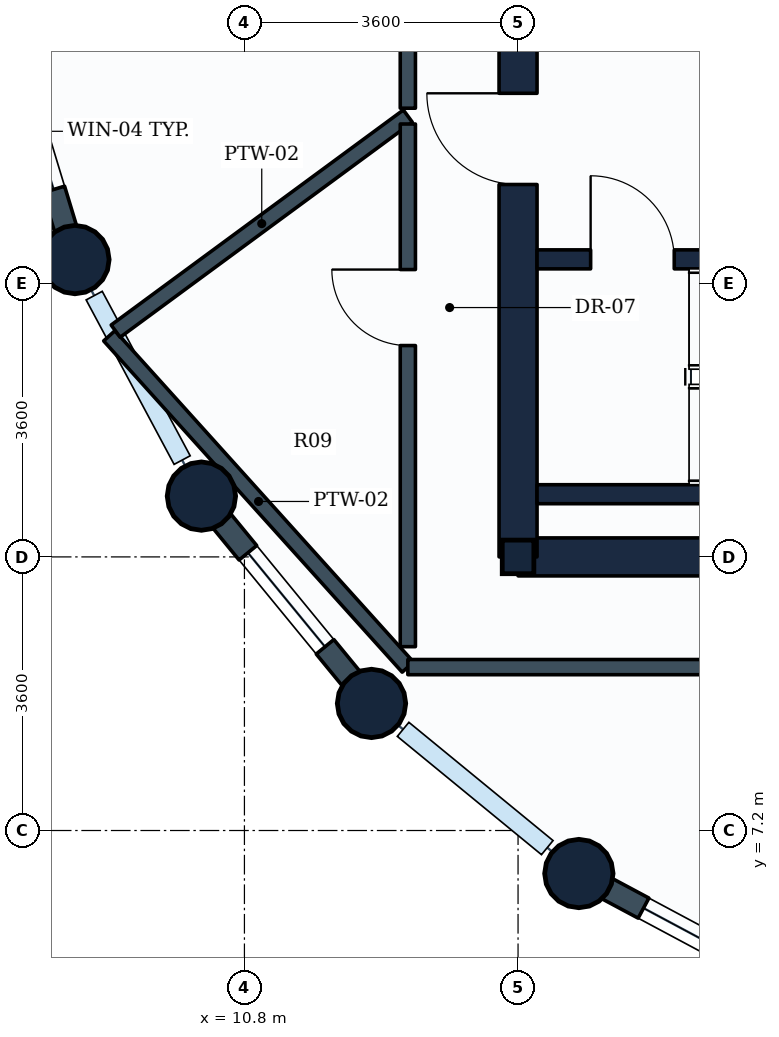
"""IFC4 building model, lengths in metres.
Left out: names, types, materials, properties, quantities, classifications, styles, units other than length and angle.
Written with IfcOpenShell. Run it as: python <this file> out.ifc"""

import sys

from ifc_helpers import new_model, si_unit, direction, frame, frame_2d, origin, origin_2d, place, context, subcontext, project, spatial, rectangle, circle, i_section, extrude, element, fill, save


model = new_model("IFC4")
c1 = context("Model", 3, precision=1e-05, world=origin(), true_north=direction((0.0, 1.0)))
c2 = subcontext(c1, "Body", "Model", "MODEL_VIEW")
j1 = project(units=[si_unit("LENGTHUNIT", "METRE"), si_unit("PLANEANGLEUNIT", "RADIAN")], contexts=[c1])
p1 = place(None, origin())
s1 = spatial("IfcSite", under=j1, at=p1, CompositionType="ELEMENT")
p2 = place(p1, origin())
s2 = spatial("IfcBuilding", under=s1, at=p2, CompositionType="ELEMENT")
p3 = place(p2, frame((0.0, 0.0, 135.2)))
s3 = spatial("IfcBuildingStorey", under=s2, at=p3, CompositionType="ELEMENT", Elevation=135.2)
for number, where, z_axis, x_axis in (
    (1, (8.57, 14.712, 0.0), (0.0, 0.0, 1.0), (1.0, 0.0, 0.0)),
    (2, (10.234, 11.6, 0.0), (0.0, 0.0, 1.0), (1.0, 0.0, 0.0)),
    (3, (12.472, 8.872, 0.0), (0.0, 0.0, 1.0), (1.0, 0.0, 0.0)),
):
    element("IfcColumn", number, at=place(p3, frame(where, z_axis=z_axis, x_axis=x_axis)), inside=s3, PredefinedType="COLUMN", context=c2, shape_type="SweptSolid", body=[
        extrude(circle(Radius=0.45, at=origin_2d()), origin(), (0.0, 0.0, 1.0), 3.8),
    ])
p4 = place(p3, frame((14.4, 10.8, 0.0), z_axis=(0.0, 0.0, 1.0), x_axis=(1.0, 0.0, 0.0)))
e4 = element("IfcColumn", 4, at=p4, inside=s3, PredefinedType="COLUMN", context=c2, shape_type="SweptSolid", body=[
    extrude(i_section(OverallWidth=0.416, OverallDepth=0.442, WebThickness=0.025, FlangeThickness=0.041, FilletRadius=0.015, at=origin_2d()), origin(), (0.0, 0.0, 1.0), 3.8),
])
p5 = place(p3, frame((15.2, 6.634, 0.0), z_axis=(0.0, 0.0, 1.0), x_axis=(1.0, 0.0, 0.0)))
e5 = element("IfcColumn", 5, at=p5, inside=s3, PredefinedType="COLUMN", context=c2, shape_type="SweptSolid", body=[
    extrude(circle(Radius=0.45, at=origin_2d()), origin(), (0.0, 0.0, 1.0), 3.8),
])
p6 = place(p3, frame((8.57, 14.712, 0.0), z_axis=(0.0, 0.0, 1.0), x_axis=(-0.290305086481, 0.956934144423, 0.0)))
e6 = element("IfcWall", 6, at=p6, inside=s3, PredefinedType="STANDARD", context=c2, shape_type="SweptSolid", body=[
    extrude(rectangle(XDim=3.528, YDim=0.3, at=frame_2d((1.764, 0.0))), origin(), (0.0, 0.0, 1.0), 2.93),
])
p7 = place(p6, frame((0.964, 0.0, 0.85)))
e7 = element("IfcOpeningElement", 7, at=p7, cuts=e6, PredefinedType="OPENING", context=c2, shape_type="SweptSolid", body=[
    extrude(rectangle(XDim=1.6, YDim=1.35, at=frame_2d((0.8, 0.675))), frame((0.0, 0.16, 0.0), z_axis=(0.0, -1.0, 0.0), x_axis=(1.0, 0.0, 0.0)), (0.0, 0.0, 1.0), 0.32),
])
p8 = place(p3, frame((12.472, 8.872, 0.0), z_axis=(0.0, 0.0, 1.0), x_axis=(-0.634258295121, 0.773121216285, 0.0)))
e8 = element("IfcWall", 8, at=p8, inside=s3, PredefinedType="STANDARD", context=c2, shape_type="SweptSolid", body=[
    extrude(rectangle(XDim=3.529, YDim=0.3, at=frame_2d((1.764, 0.0))), origin(), (0.0, 0.0, 1.0), 2.93),
])
p9 = place(p8, frame((0.964, 0.0, 0.85)))
e9 = element("IfcOpeningElement", 9, at=p9, cuts=e8, PredefinedType="OPENING", context=c2, shape_type="SweptSolid", body=[
    extrude(rectangle(XDim=1.6, YDim=1.35, at=frame_2d((0.8, 0.675))), frame((0.0, 0.16, 0.0), z_axis=(0.0, -1.0, 0.0), x_axis=(1.0, 0.0, 0.0)), (0.0, 0.0, 1.0), 0.32),
])
p10 = place(p3, frame((18.312, 4.97, 0.0), z_axis=(0.0, 0.0, 1.0), x_axis=(-0.881846862014, 0.471535907389, 0.0)))
e10 = element("IfcWall", 10, at=p10, inside=s3, PredefinedType="STANDARD", context=c2, shape_type="SweptSolid", body=[
    extrude(rectangle(XDim=3.529, YDim=0.3, at=frame_2d((1.765, 0.0))), origin(), (0.0, 0.0, 1.0), 2.93),
])
p11 = place(p10, frame((0.964, 0.0, 0.85)))
e11 = element("IfcOpeningElement", 11, at=p11, cuts=e10, PredefinedType="OPENING", context=c2, shape_type="SweptSolid", body=[
    extrude(rectangle(XDim=1.6, YDim=1.35, at=frame_2d((0.8, 0.675))), frame((0.0, 0.16, 0.0), z_axis=(0.0, -1.0, 0.0), x_axis=(1.0, 0.0, 0.0)), (0.0, 0.0, 1.0), 0.32),
])
p12 = place(p3, frame((14.4, 10.8, 0.0), z_axis=(0.0, 0.0, 1.0), x_axis=(1.0, 0.0, 0.0)))
e12 = element("IfcWall", 12, at=p12, inside=s3, PredefinedType="SHEAR", context=c2, shape_type="SweptSolid", body=[
    extrude(rectangle(XDim=18.0, YDim=0.5, at=frame_2d((9.0, 0.0))), origin(), (0.0, 0.0, 1.0), 3.55),
])
p13 = place(p3, frame((14.4, 10.8, 0.0), z_axis=(0.0, 0.0, 1.0), x_axis=(0.0, 1.0, 0.0)))
e13 = element("IfcWall", 13, at=p13, inside=s3, PredefinedType="SHEAR", context=c2, shape_type="SweptSolid", body=[
    extrude(rectangle(XDim=14.4, YDim=0.5, at=frame_2d((7.2, 0.0))), origin(), (0.0, 0.0, 1.0), 3.55),
])
p14 = place(p13, frame((11.05, 0.0, 0.0)))
e14 = element("IfcOpeningElement", 14, at=p14, cuts=e13, PredefinedType="OPENING", context=c2, shape_type="SweptSolid", body=[
    extrude(rectangle(XDim=1.1, YDim=2.1, at=frame_2d((0.55, 1.05))), frame((0.0, 0.26, 0.0), z_axis=(0.0, -1.0, 0.0), x_axis=(1.0, 0.0, 0.0)), (0.0, 0.0, 1.0), 0.52),
])
p15 = place(p13, frame((4.9, 0.0, 0.0)))
e15 = element("IfcOpeningElement", 15, at=p15, cuts=e13, PredefinedType="OPENING", context=c2, shape_type="SweptSolid", body=[
    extrude(rectangle(XDim=1.2, YDim=2.1, at=frame_2d((0.6, 1.05))), frame((0.0, 0.26, 0.0), z_axis=(0.0, -1.0, 0.0), x_axis=(1.0, 0.0, 0.0)), (0.0, 0.0, 1.0), 0.52),
])
p16 = place(p13, frame((8.15, 0.0, 0.0)))
e16 = element("IfcOpeningElement", 16, at=p16, cuts=e13, PredefinedType="OPENING", context=c2, shape_type="SweptSolid", body=[
    extrude(rectangle(XDim=0.9, YDim=2.1, at=frame_2d((0.45, 1.05))), frame((0.0, 0.26, 0.0), z_axis=(0.0, -1.0, 0.0), x_axis=(1.0, 0.0, 0.0)), (0.0, 0.0, 1.0), 0.52),
])
p17 = place(p3, frame((14.65, 11.625, 0.0), z_axis=(0.0, 0.0, 1.0), x_axis=(1.0, 0.0, 0.0)))
e17 = element("IfcWall", 17, at=p17, inside=s3, PredefinedType="SHEAR", context=c2, shape_type="SweptSolid", body=[
    extrude(rectangle(XDim=8.7, YDim=0.25, at=frame_2d((4.35, 0.0))), origin(), (0.0, 0.0, 1.0), 3.55),
])
p18 = place(p3, frame((14.65, 14.715, 0.0), z_axis=(0.0, 0.0, 1.0), x_axis=(1.0, 0.0, 0.0)))
e18 = element("IfcWall", 18, at=p18, inside=s3, PredefinedType="SHEAR", context=c2, shape_type="SweptSolid", body=[
    extrude(rectangle(XDim=8.7, YDim=0.25, at=frame_2d((4.35, 0.0))), origin(), (0.0, 0.0, 1.0), 3.55),
])
p19 = place(p18, frame((0.705, 0.0, 0.0)))
e19 = element("IfcOpeningElement", 19, at=p19, cuts=e18, PredefinedType="OPENING", context=c2, shape_type="SweptSolid", body=[
    extrude(rectangle(XDim=1.1, YDim=2.1, at=frame_2d((0.55, 1.05))), frame((0.0, 0.135, 0.0), z_axis=(0.0, -1.0, 0.0), x_axis=(1.0, 0.0, 0.0)), (0.0, 0.0, 1.0), 0.27),
])
p20 = place(p3, frame((12.95, 9.35, 0.0), z_axis=(0.0, 0.0, 1.0), x_axis=(-0.669433552235, 0.742871939934, 0.0)))
e20 = element("IfcWall", 20, at=p20, inside=s3, PredefinedType="PARTITIONING", context=c2, shape_type="SweptSolid", body=[
    extrude(rectangle(XDim=5.868, YDim=0.2, at=frame_2d((2.934, 0.0))), origin(), (0.0, 0.0, 1.0), 2.93),
])
p21 = place(p3, frame((12.95, 16.6, 0.0), z_axis=(0.0, 0.0, 1.0), x_axis=(-0.805356553796, -0.592790706116, 0.0)))
e21 = element("IfcWall", 21, at=p21, inside=s3, PredefinedType="PARTITIONING", context=c2, shape_type="SweptSolid", body=[
    extrude(rectangle(XDim=4.773, YDim=0.2, at=frame_2d((2.387, 0.0))), origin(), (0.0, 0.0, 1.0), 2.93),
])
p22 = place(p3, frame((12.95, 16.704, 0.0), z_axis=(0.0, 0.0, 1.0), x_axis=(0.0, 1.0, 0.0)))
e22 = element("IfcWall", 22, at=p22, inside=s3, PredefinedType="PARTITIONING", context=c2, shape_type="SweptSolid", body=[
    extrude(rectangle(XDim=8.417, YDim=0.2, at=frame_2d((4.208, 0.0))), origin(), (0.0, 0.0, 1.0), 3.18),
])
p23 = place(p22, frame((3.696, 0.0, 0.0)))
e23 = element("IfcOpeningElement", 23, at=p23, cuts=e22, PredefinedType="OPENING", context=c2, shape_type="SweptSolid", body=[
    extrude(rectangle(XDim=1.0, YDim=2.1, at=frame_2d((0.5, 1.05))), frame((0.0, 0.11, 0.0), z_axis=(0.0, -1.0, 0.0), x_axis=(1.0, 0.0, 0.0)), (0.0, 0.0, 1.0), 0.22),
])
p24 = place(p3, frame((12.95, 9.619, 0.0), z_axis=(0.0, 0.0, 1.0), x_axis=(0.0, 1.0, 0.0)))
e24 = element("IfcWall", 24, at=p24, inside=s3, PredefinedType="PARTITIONING", context=c2, shape_type="SweptSolid", body=[
    extrude(rectangle(XDim=6.877, YDim=0.2, at=frame_2d((3.438, 0.0))), origin(), (0.0, 0.0, 1.0), 3.17),
])
p25 = place(p24, frame((3.962, 0.0, 0.0)))
e25 = element("IfcOpeningElement", 25, at=p25, cuts=e24, PredefinedType="OPENING", context=c2, shape_type="SweptSolid", body=[
    extrude(rectangle(XDim=1.0, YDim=2.1, at=frame_2d((0.5, 1.05))), frame((0.0, 0.11, 0.0), z_axis=(0.0, -1.0, 0.0), x_axis=(1.0, 0.0, 0.0)), (0.0, 0.0, 1.0), 0.22),
])
p26 = place(p3, frame((12.95, 9.35, 0.0), z_axis=(0.0, 0.0, 1.0), x_axis=(1.0, 0.0, 0.0)))
e26 = element("IfcWall", 26, at=p26, inside=s3, PredefinedType="PARTITIONING", context=c2, shape_type="SweptSolid", body=[
    extrude(rectangle(XDim=15.771, YDim=0.2, at=frame_2d((7.885, 0.0))), origin(), (0.0, 0.0, 1.0), 3.17),
])
p27 = place(p26, frame((4.836, 0.0, 0.0)))
e27 = element("IfcOpeningElement", 27, at=p27, cuts=e26, PredefinedType="OPENING", context=c2, shape_type="SweptSolid", body=[
    extrude(rectangle(XDim=1.0, YDim=2.1, at=frame_2d((0.5, 1.05))), frame((0.0, 0.11, 0.0), z_axis=(0.0, -1.0, 0.0), x_axis=(1.0, 0.0, 0.0)), (0.0, 0.0, 1.0), 0.22),
])
p28 = place(p7, origin())
e28 = element("IfcWindow", 28, at=p28, inside=s3, PartitioningType="SINGLE_PANEL", PredefinedType="WINDOW", context=c2, shape_type="SweptSolid", body=[
    extrude(rectangle(XDim=1.6, YDim=1.35, at=frame_2d((0.8, 0.675))), frame((0.0, 0.03, 0.0), z_axis=(0.0, -1.0, 0.0), x_axis=(1.0, 0.0, 0.0)), (0.0, 0.0, 1.0), 0.06),
])
fill(e7, e28)
p29 = place(p9, origin())
e29 = element("IfcWindow", 29, at=p29, inside=s3, PartitioningType="SINGLE_PANEL", PredefinedType="WINDOW", context=c2, shape_type="SweptSolid", body=[
    extrude(rectangle(XDim=1.6, YDim=1.35, at=frame_2d((0.8, 0.675))), frame((0.0, 0.03, 0.0), z_axis=(0.0, -1.0, 0.0), x_axis=(1.0, 0.0, 0.0)), (0.0, 0.0, 1.0), 0.06),
])
fill(e9, e29)
p30 = place(p11, origin())
e30 = element("IfcWindow", 30, at=p30, inside=s3, PartitioningType="SINGLE_PANEL", PredefinedType="WINDOW", context=c2, shape_type="SweptSolid", body=[
    extrude(rectangle(XDim=1.6, YDim=1.35, at=frame_2d((0.8, 0.675))), frame((0.0, 0.03, 0.0), z_axis=(0.0, -1.0, 0.0), x_axis=(1.0, 0.0, 0.0)), (0.0, 0.0, 1.0), 0.06),
])
fill(e11, e30)
p31 = place(p19, origin())
e31 = element("IfcDoor", 31, at=p31, inside=s3, OperationType="SINGLE_SWING_LEFT", PredefinedType="DOOR", context=c2, shape_type="SweptSolid", body=[
    extrude(rectangle(XDim=1.1, YDim=2.1, at=frame_2d((0.55, 1.05))), frame((0.0, 0.025, 0.0), z_axis=(0.0, -1.0, 0.0), x_axis=(1.0, 0.0, 0.0)), (0.0, 0.0, 1.0), 0.05),
])
fill(e19, e31)
p32 = place(p15, origin())
e32 = element("IfcDoor", 32, at=p32, inside=s3, OperationType="SINGLE_SWING_RIGHT", PredefinedType="DOOR", context=c2, shape_type="SweptSolid", body=[
    extrude(rectangle(XDim=1.2, YDim=2.1, at=frame_2d((0.6, 1.05))), frame((0.0, 0.025, 0.0), z_axis=(0.0, -1.0, 0.0), x_axis=(1.0, 0.0, 0.0)), (0.0, 0.0, 1.0), 0.05),
])
fill(e15, e32)
p33 = place(p25, origin())
e33 = element("IfcDoor", 33, at=p33, inside=s3, OperationType="SINGLE_SWING_RIGHT", PredefinedType="DOOR", context=c2, shape_type="SweptSolid", body=[
    extrude(rectangle(XDim=1.0, YDim=2.1, at=frame_2d((0.5, 1.05))), frame((0.0, 0.025, 0.0), z_axis=(0.0, -1.0, 0.0), x_axis=(1.0, 0.0, 0.0)), (0.0, 0.0, 1.0), 0.05),
])
fill(e25, e33)
save(model, sys.argv[1])
